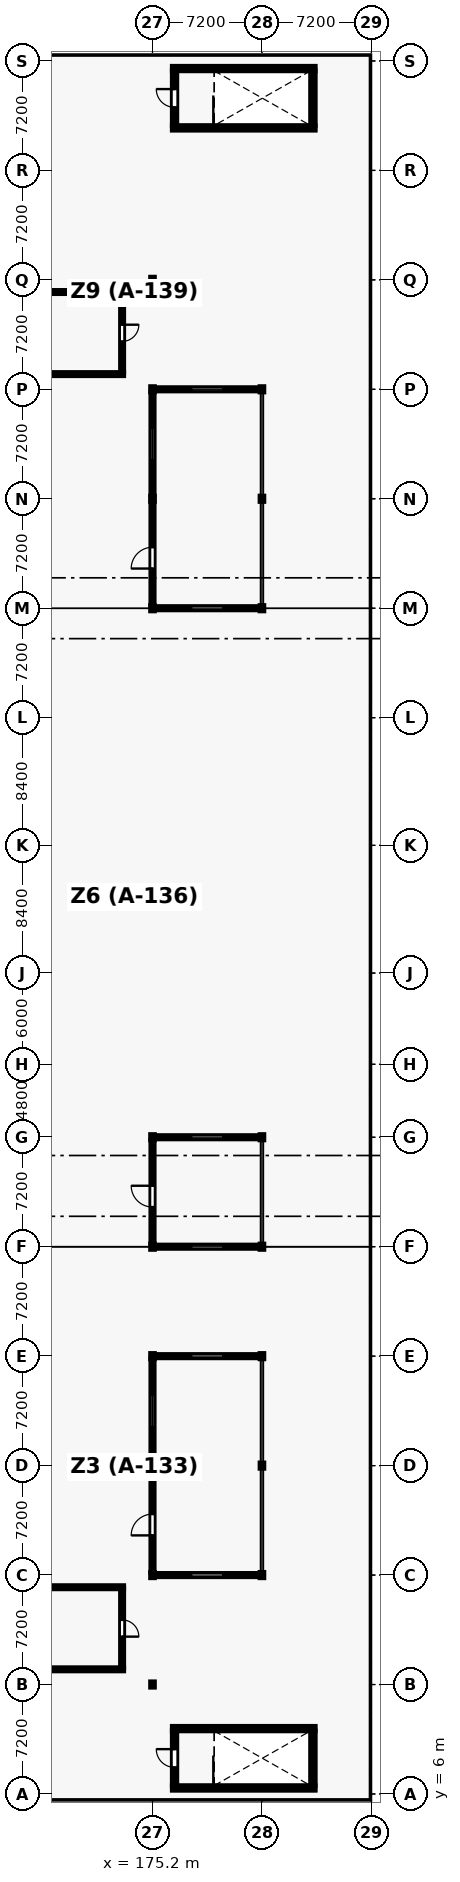
"""IFC4 building model, lengths in metres.
Left out: names, types, materials, properties, quantities, classifications, styles, units other than length and angle.
Written with IfcOpenShell. Run it as: python <this file> out.ifc"""

import sys

from ifc_helpers import new_model, si_unit, direction, frame, frame_2d, origin, origin_2d, place, context, subcontext, project, spatial, rectangle, i_section, extrude, element, fill, save


model = new_model("IFC4")
c1 = context("Model", 3, precision=1e-05, world=origin(), true_north=direction((0.0, 1.0)))
c2 = subcontext(c1, "Body", "Model", "MODEL_VIEW")
j1 = project(units=[si_unit("LENGTHUNIT", "METRE"), si_unit("PLANEANGLEUNIT", "RADIAN")], contexts=[c1])
p1 = place(None, origin())
s1 = spatial("IfcSite", under=j1, at=p1, CompositionType="ELEMENT")
p2 = place(p1, origin())
s2 = spatial("IfcBuilding", under=s1, at=p2, CompositionType="ELEMENT")
p3 = place(p2, frame((0.0, 0.0, 13.2)))
s3 = spatial("IfcBuildingStorey", under=s2, at=p3, CompositionType="ELEMENT", Elevation=13.2)
for number, where, z_axis, x_axis in (
    (1, (175.2, 13.2, 0.0), (0.0, 0.0, 1.0), (1.0, 0.0, 0.0)),
    (2, (175.2, 20.4, 0.0), (0.0, 0.0, 1.0), (1.0, 0.0, 0.0)),
    (3, (175.2, 27.6, 0.0), (0.0, 0.0, 1.0), (1.0, 0.0, 0.0)),
    (4, (175.2, 34.8, 0.0), (0.0, 0.0, 1.0), (1.0, 0.0, 0.0)),
    (5, (175.2, 42.0, 0.0), (0.0, 0.0, 1.0), (1.0, 0.0, 0.0)),
    (6, (175.2, 49.2, 0.0), (0.0, 0.0, 1.0), (1.0, 0.0, 0.0)),
    (7, (175.2, 84.0, 0.0), (0.0, 0.0, 1.0), (1.0, 0.0, 0.0)),
    (8, (175.2, 91.2, 0.0), (0.0, 0.0, 1.0), (1.0, 0.0, 0.0)),
    (9, (175.2, 98.4, 0.0), (0.0, 0.0, 1.0), (1.0, 0.0, 0.0)),
    (10, (175.2, 105.6, 0.0), (0.0, 0.0, 1.0), (1.0, 0.0, 0.0)),
    (11, (182.4, 20.4, 0.0), (0.0, 0.0, 1.0), (1.0, 0.0, 0.0)),
    (12, (182.4, 27.6, 0.0), (0.0, 0.0, 1.0), (1.0, 0.0, 0.0)),
    (13, (182.4, 34.8, 0.0), (0.0, 0.0, 1.0), (1.0, 0.0, 0.0)),
    (14, (182.4, 42.0, 0.0), (0.0, 0.0, 1.0), (1.0, 0.0, 0.0)),
    (15, (182.4, 49.2, 0.0), (0.0, 0.0, 1.0), (1.0, 0.0, 0.0)),
    (16, (182.4, 84.0, 0.0), (0.0, 0.0, 1.0), (1.0, 0.0, 0.0)),
    (17, (182.4, 91.2, 0.0), (0.0, 0.0, 1.0), (1.0, 0.0, 0.0)),
    (18, (182.4, 98.4, 0.0), (0.0, 0.0, 1.0), (1.0, 0.0, 0.0)),
):
    element("IfcColumn", number, at=place(p3, frame(where, z_axis=z_axis, x_axis=x_axis)), inside=s3, PredefinedType="COLUMN", context=c2, shape_type="SweptSolid", body=[
        extrude(i_section(OverallWidth=0.254, OverallDepth=0.356, WebThickness=0.01, FlangeThickness=0.018, FilletRadius=0.015, at=origin_2d()), origin(), (0.0, 0.0, 1.0), 3.66),
    ])
p4 = place(p3, frame((175.2, 20.58, 0.0), z_axis=(0.0, 0.0, 1.0), x_axis=(0.0, 1.0, 0.0)))
e19 = element("IfcWall", 19, at=p4, inside=s3, PredefinedType="STANDARD", context=c2, shape_type="SweptSolid", body=[
    extrude(rectangle(XDim=6.84, YDim=0.22, at=frame_2d((3.42, 0.0))), origin(), (0.0, 0.0, 1.0), 3.19),
])
p5 = place(p4, frame((2.43, 0.0, 0.0)))
e20 = element("IfcOpeningElement", 20, at=p5, cuts=e19, PredefinedType="OPENING", context=c2, shape_type="SweptSolid", body=[
    extrude(rectangle(XDim=1.4, YDim=2.15, at=frame_2d((0.7, 1.075))), frame((0.0, 0.12, 0.0), z_axis=(0.0, -1.0, 0.0), x_axis=(1.0, 0.0, 0.0)), (0.0, 0.0, 1.0), 0.24),
])
p6 = place(p3, frame((175.2, 27.78, 0.0), z_axis=(0.0, 0.0, 1.0), x_axis=(0.0, 1.0, 0.0)))
e21 = element("IfcWall", 21, at=p6, inside=s3, PredefinedType="STANDARD", context=c2, shape_type="SweptSolid", body=[
    extrude(rectangle(XDim=6.84, YDim=0.22, at=frame_2d((3.42, 0.0))), origin(), (0.0, 0.0, 1.0), 3.19),
])
p7 = place(p6, frame((2.37, 0.0, 0.95)))
e22 = element("IfcOpeningElement", 22, at=p7, cuts=e21, PredefinedType="OPENING", context=c2, shape_type="SweptSolid", body=[
    extrude(rectangle(XDim=2.1, YDim=1.5, at=frame_2d((1.05, 0.75))), frame((0.0, 0.12, 0.0), z_axis=(0.0, -1.0, 0.0), x_axis=(1.0, 0.0, 0.0)), (0.0, 0.0, 1.0), 0.24),
])
p8 = place(p3, frame((182.266, 20.4, 0.0), z_axis=(0.0, 0.0, 1.0), x_axis=(-1.0, 0.0, 0.0)))
e23 = element("IfcWall", 23, at=p8, inside=s3, PredefinedType="STANDARD", context=c2, shape_type="SweptSolid", body=[
    extrude(rectangle(XDim=6.932, YDim=0.22, at=frame_2d((3.466, 0.0))), origin(), (0.0, 0.0, 1.0), 3.19),
])
p9 = place(p8, frame((2.416, 0.0, 0.95)))
e24 = element("IfcOpeningElement", 24, at=p9, cuts=e23, PredefinedType="OPENING", context=c2, shape_type="SweptSolid", body=[
    extrude(rectangle(XDim=2.1, YDim=1.5, at=frame_2d((1.05, 0.75))), frame((0.0, 0.12, 0.0), z_axis=(0.0, -1.0, 0.0), x_axis=(1.0, 0.0, 0.0)), (0.0, 0.0, 1.0), 0.24),
])
p10 = place(p3, frame((175.334, 34.8, 0.0), z_axis=(0.0, 0.0, 1.0), x_axis=(1.0, 0.0, 0.0)))
e25 = element("IfcWall", 25, at=p10, inside=s3, PredefinedType="STANDARD", context=c2, shape_type="SweptSolid", body=[
    extrude(rectangle(XDim=6.932, YDim=0.22, at=frame_2d((3.466, 0.0))), origin(), (0.0, 0.0, 1.0), 3.19),
])
p11 = place(p10, frame((2.416, 0.0, 0.95)))
e26 = element("IfcOpeningElement", 26, at=p11, cuts=e25, PredefinedType="OPENING", context=c2, shape_type="SweptSolid", body=[
    extrude(rectangle(XDim=2.1, YDim=1.5, at=frame_2d((1.05, 0.75))), frame((0.0, 0.12, 0.0), z_axis=(0.0, -1.0, 0.0), x_axis=(1.0, 0.0, 0.0)), (0.0, 0.0, 1.0), 0.24),
])
p12 = place(p3, frame((175.2, 42.18, 0.0), z_axis=(0.0, 0.0, 1.0), x_axis=(0.0, 1.0, 0.0)))
e27 = element("IfcWall", 27, at=p12, inside=s3, PredefinedType="STANDARD", context=c2, shape_type="SweptSolid", body=[
    extrude(rectangle(XDim=6.84, YDim=0.22, at=frame_2d((3.42, 0.0))), origin(), (0.0, 0.0, 1.0), 3.19),
])
p13 = place(p12, frame((2.43, 0.0, 0.0)))
e28 = element("IfcOpeningElement", 28, at=p13, cuts=e27, PredefinedType="OPENING", context=c2, shape_type="SweptSolid", body=[
    extrude(rectangle(XDim=1.4, YDim=2.15, at=frame_2d((0.7, 1.075))), frame((0.0, 0.12, 0.0), z_axis=(0.0, -1.0, 0.0), x_axis=(1.0, 0.0, 0.0)), (0.0, 0.0, 1.0), 0.24),
])
p14 = place(p3, frame((182.266, 42.0, 0.0), z_axis=(0.0, 0.0, 1.0), x_axis=(-1.0, 0.0, 0.0)))
e29 = element("IfcWall", 29, at=p14, inside=s3, PredefinedType="STANDARD", context=c2, shape_type="SweptSolid", body=[
    extrude(rectangle(XDim=6.932, YDim=0.22, at=frame_2d((3.466, 0.0))), origin(), (0.0, 0.0, 1.0), 3.19),
])
p15 = place(p14, frame((2.416, 0.0, 0.95)))
e30 = element("IfcOpeningElement", 30, at=p15, cuts=e29, PredefinedType="OPENING", context=c2, shape_type="SweptSolid", body=[
    extrude(rectangle(XDim=2.1, YDim=1.5, at=frame_2d((1.05, 0.75))), frame((0.0, 0.12, 0.0), z_axis=(0.0, -1.0, 0.0), x_axis=(1.0, 0.0, 0.0)), (0.0, 0.0, 1.0), 0.24),
])
p16 = place(p3, frame((175.334, 49.2, 0.0), z_axis=(0.0, 0.0, 1.0), x_axis=(1.0, 0.0, 0.0)))
e31 = element("IfcWall", 31, at=p16, inside=s3, PredefinedType="STANDARD", context=c2, shape_type="SweptSolid", body=[
    extrude(rectangle(XDim=6.932, YDim=0.22, at=frame_2d((3.466, 0.0))), origin(), (0.0, 0.0, 1.0), 3.19),
])
p17 = place(p16, frame((2.416, 0.0, 0.95)))
e32 = element("IfcOpeningElement", 32, at=p17, cuts=e31, PredefinedType="OPENING", context=c2, shape_type="SweptSolid", body=[
    extrude(rectangle(XDim=2.1, YDim=1.5, at=frame_2d((1.05, 0.75))), frame((0.0, 0.12, 0.0), z_axis=(0.0, -1.0, 0.0), x_axis=(1.0, 0.0, 0.0)), (0.0, 0.0, 1.0), 0.24),
])
p18 = place(p3, frame((175.2, 84.18, 0.0), z_axis=(0.0, 0.0, 1.0), x_axis=(0.0, 1.0, 0.0)))
e33 = element("IfcWall", 33, at=p18, inside=s3, PredefinedType="STANDARD", context=c2, shape_type="SweptSolid", body=[
    extrude(rectangle(XDim=6.84, YDim=0.22, at=frame_2d((3.42, 0.0))), origin(), (0.0, 0.0, 1.0), 3.19),
])
p19 = place(p18, frame((2.43, 0.0, 0.0)))
e34 = element("IfcOpeningElement", 34, at=p19, cuts=e33, PredefinedType="OPENING", context=c2, shape_type="SweptSolid", body=[
    extrude(rectangle(XDim=1.4, YDim=2.15, at=frame_2d((0.7, 1.075))), frame((0.0, 0.12, 0.0), z_axis=(0.0, -1.0, 0.0), x_axis=(1.0, 0.0, 0.0)), (0.0, 0.0, 1.0), 0.24),
])
p20 = place(p3, frame((175.2, 91.38, 0.0), z_axis=(0.0, 0.0, 1.0), x_axis=(0.0, 1.0, 0.0)))
e35 = element("IfcWall", 35, at=p20, inside=s3, PredefinedType="STANDARD", context=c2, shape_type="SweptSolid", body=[
    extrude(rectangle(XDim=6.84, YDim=0.22, at=frame_2d((3.42, 0.0))), origin(), (0.0, 0.0, 1.0), 3.19),
])
p21 = place(p20, frame((2.37, 0.0, 0.95)))
e36 = element("IfcOpeningElement", 36, at=p21, cuts=e35, PredefinedType="OPENING", context=c2, shape_type="SweptSolid", body=[
    extrude(rectangle(XDim=2.1, YDim=1.5, at=frame_2d((1.05, 0.75))), frame((0.0, 0.12, 0.0), z_axis=(0.0, -1.0, 0.0), x_axis=(1.0, 0.0, 0.0)), (0.0, 0.0, 1.0), 0.24),
])
p22 = place(p3, frame((182.266, 84.0, 0.0), z_axis=(0.0, 0.0, 1.0), x_axis=(-1.0, 0.0, 0.0)))
e37 = element("IfcWall", 37, at=p22, inside=s3, PredefinedType="STANDARD", context=c2, shape_type="SweptSolid", body=[
    extrude(rectangle(XDim=6.932, YDim=0.22, at=frame_2d((3.466, 0.0))), origin(), (0.0, 0.0, 1.0), 3.19),
])
p23 = place(p22, frame((2.416, 0.0, 0.95)))
e38 = element("IfcOpeningElement", 38, at=p23, cuts=e37, PredefinedType="OPENING", context=c2, shape_type="SweptSolid", body=[
    extrude(rectangle(XDim=2.1, YDim=1.5, at=frame_2d((1.05, 0.75))), frame((0.0, 0.12, 0.0), z_axis=(0.0, -1.0, 0.0), x_axis=(1.0, 0.0, 0.0)), (0.0, 0.0, 1.0), 0.24),
])
p24 = place(p3, frame((175.334, 98.4, 0.0), z_axis=(0.0, 0.0, 1.0), x_axis=(1.0, 0.0, 0.0)))
e39 = element("IfcWall", 39, at=p24, inside=s3, PredefinedType="STANDARD", context=c2, shape_type="SweptSolid", body=[
    extrude(rectangle(XDim=6.932, YDim=0.22, at=frame_2d((3.466, 0.0))), origin(), (0.0, 0.0, 1.0), 3.19),
])
p25 = place(p24, frame((2.416, 0.0, 0.95)))
e40 = element("IfcOpeningElement", 40, at=p25, cuts=e39, PredefinedType="OPENING", context=c2, shape_type="SweptSolid", body=[
    extrude(rectangle(XDim=2.1, YDim=1.5, at=frame_2d((1.05, 0.75))), frame((0.0, 0.12, 0.0), z_axis=(0.0, -1.0, 0.0), x_axis=(1.0, 0.0, 0.0)), (0.0, 0.0, 1.0), 0.24),
])
for number, where, z_axis, x_axis in (
    (41, (185.9, 6.4, 0.0), (0.0, 0.0, 1.0), (-1.0, 0.0, 0.0)),
    (42, (176.5, 10.3, 0.0), (0.0, 0.0, 1.0), (1.0, 0.0, 0.0)),
):
    element("IfcWall", number, at=place(p3, frame(where, z_axis=z_axis, x_axis=x_axis)), inside=s3, PredefinedType="SOLIDWALL", context=c2, shape_type="SweptSolid", body=[
        extrude(rectangle(XDim=9.4, YDim=0.3, at=frame_2d((4.7, 0.0))), origin(), (0.0, 0.0, 1.0), 3.4),
    ])
p26 = place(p3, frame((176.65, 6.55, 0.0), z_axis=(0.0, 0.0, 1.0), x_axis=(0.0, 1.0, 0.0)))
e43 = element("IfcWall", 43, at=p26, inside=s3, PredefinedType="SOLIDWALL", context=c2, shape_type="SweptSolid", body=[
    extrude(rectangle(XDim=3.6, YDim=0.3, at=frame_2d((1.8, 0.0))), origin(), (0.0, 0.0, 1.0), 3.4),
])
p27 = place(p26, frame((1.2, 0.0, 0.0)))
e44 = element("IfcOpeningElement", 44, at=p27, cuts=e43, PredefinedType="OPENING", context=c2, shape_type="SweptSolid", body=[
    extrude(rectangle(XDim=1.2, YDim=2.2, at=frame_2d((0.6, 1.1))), frame((0.0, 0.16, 0.0), z_axis=(0.0, -1.0, 0.0), x_axis=(1.0, 0.0, 0.0)), (0.0, 0.0, 1.0), 0.32),
])
p28 = place(p3, frame((185.75, 10.15, 0.0), z_axis=(0.0, 0.0, 1.0), x_axis=(0.0, -1.0, 0.0)))
e45 = element("IfcWall", 45, at=p28, inside=s3, PredefinedType="SOLIDWALL", context=c2, shape_type="SweptSolid", body=[
    extrude(rectangle(XDim=3.6, YDim=0.3, at=frame_2d((1.8, 0.0))), origin(), (0.0, 0.0, 1.0), 3.4),
])
for number, where, z_axis, x_axis in (
    (46, (185.9, 115.6, 0.0), (0.0, 0.0, 1.0), (-1.0, 0.0, 0.0)),
    (47, (176.5, 119.5, 0.0), (0.0, 0.0, 1.0), (1.0, 0.0, 0.0)),
):
    element("IfcWall", number, at=place(p3, frame(where, z_axis=z_axis, x_axis=x_axis)), inside=s3, PredefinedType="SOLIDWALL", context=c2, shape_type="SweptSolid", body=[
        extrude(rectangle(XDim=9.4, YDim=0.3, at=frame_2d((4.7, 0.0))), origin(), (0.0, 0.0, 1.0), 3.4),
    ])
p29 = place(p3, frame((176.65, 115.75, 0.0), z_axis=(0.0, 0.0, 1.0), x_axis=(0.0, 1.0, 0.0)))
e48 = element("IfcWall", 48, at=p29, inside=s3, PredefinedType="SOLIDWALL", context=c2, shape_type="SweptSolid", body=[
    extrude(rectangle(XDim=3.6, YDim=0.3, at=frame_2d((1.8, 0.0))), origin(), (0.0, 0.0, 1.0), 3.4),
])
p30 = place(p29, frame((1.2, 0.0, 0.0)))
e49 = element("IfcOpeningElement", 49, at=p30, cuts=e48, PredefinedType="OPENING", context=c2, shape_type="SweptSolid", body=[
    extrude(rectangle(XDim=1.2, YDim=2.2, at=frame_2d((0.6, 1.1))), frame((0.0, 0.16, 0.0), z_axis=(0.0, -1.0, 0.0), x_axis=(1.0, 0.0, 0.0)), (0.0, 0.0, 1.0), 0.32),
])
p31 = place(p3, frame((185.75, 119.35, 0.0), z_axis=(0.0, 0.0, 1.0), x_axis=(0.0, -1.0, 0.0)))
e50 = element("IfcWall", 50, at=p31, inside=s3, PredefinedType="SOLIDWALL", context=c2, shape_type="SweptSolid", body=[
    extrude(rectangle(XDim=3.6, YDim=0.3, at=frame_2d((1.8, 0.0))), origin(), (0.0, 0.0, 1.0), 3.4),
])
for number, where, z_axis, x_axis in (
    (51, (173.306, 14.2, 0.0), (0.0, 0.0, 1.0), (-1.0, 0.0, 0.0)),
    (52, (165.906, 19.6, 0.0), (0.0, 0.0, 1.0), (1.0, 0.0, 0.0)),
):
    element("IfcWall", number, at=place(p3, frame(where, z_axis=z_axis, x_axis=x_axis)), inside=s3, PredefinedType="PARTITIONING", context=c2, shape_type="SweptSolid", body=[
        extrude(rectangle(XDim=7.4, YDim=0.212, at=frame_2d((3.7, 0.0))), origin(), (0.0, 0.0, 1.0), 3.13),
    ])
p32 = place(p3, frame((173.2, 19.492, 0.0), z_axis=(0.0, 0.0, 1.0), x_axis=(0.0, -1.0, 0.0)))
e53 = element("IfcWall", 53, at=p32, inside=s3, PredefinedType="PARTITIONING", context=c2, shape_type="SweptSolid", body=[
    extrude(rectangle(XDim=5.184, YDim=0.212, at=frame_2d((2.592, 0.0))), origin(), (0.0, 0.0, 1.0), 3.13),
])
p33 = place(p32, frame((2.042, 0.0, 0.0)))
e54 = element("IfcOpeningElement", 54, at=p33, cuts=e53, PredefinedType="OPENING", context=c2, shape_type="SweptSolid", body=[
    extrude(rectangle(XDim=1.1, YDim=2.1, at=frame_2d((0.55, 1.05))), frame((0.0, 0.116, 0.0), z_axis=(0.0, -1.0, 0.0), x_axis=(1.0, 0.0, 0.0)), (0.0, 0.0, 1.0), 0.232),
])
for number, where, z_axis, x_axis in (
    (55, (173.306, 99.4, 0.0), (0.0, 0.0, 1.0), (-1.0, 0.0, 0.0)),
    (56, (165.889, 104.8, 0.0), (0.0, 0.0, 1.0), (1.0, 0.0, 0.0)),
):
    element("IfcWall", number, at=place(p3, frame(where, z_axis=z_axis, x_axis=x_axis)), inside=s3, PredefinedType="PARTITIONING", context=c2, shape_type="SweptSolid", body=[
        extrude(rectangle(XDim=7.417, YDim=0.212, at=frame_2d((3.708, 0.0))), origin(), (0.0, 0.0, 1.0), 3.13),
    ])
p34 = place(p3, frame((173.2, 104.692, 0.0), z_axis=(0.0, 0.0, 1.0), x_axis=(0.0, -1.0, 0.0)))
e57 = element("IfcWall", 57, at=p34, inside=s3, PredefinedType="PARTITIONING", context=c2, shape_type="SweptSolid", body=[
    extrude(rectangle(XDim=5.184, YDim=0.212, at=frame_2d((2.592, 0.0))), origin(), (0.0, 0.0, 1.0), 3.13),
])
p35 = place(p34, frame((2.042, 0.0, 0.0)))
e58 = element("IfcOpeningElement", 58, at=p35, cuts=e57, PredefinedType="OPENING", context=c2, shape_type="SweptSolid", body=[
    extrude(rectangle(XDim=1.1, YDim=2.1, at=frame_2d((0.55, 1.05))), frame((0.0, 0.116, 0.0), z_axis=(0.0, -1.0, 0.0), x_axis=(1.0, 0.0, 0.0)), (0.0, 0.0, 1.0), 0.232),
])
p36 = place(p5, origin())
e59 = element("IfcDoor", 59, at=p36, inside=s3, OperationType="SINGLE_SWING_LEFT", PredefinedType="DOOR", context=c2, shape_type="SweptSolid", body=[
    extrude(rectangle(XDim=1.4, YDim=2.15, at=frame_2d((0.7, 1.075))), frame((0.0, 0.025, 0.0), z_axis=(0.0, -1.0, 0.0), x_axis=(1.0, 0.0, 0.0)), (0.0, 0.0, 1.0), 0.05),
])
fill(e20, e59)
p37 = place(p7, origin())
e60 = element("IfcWindow", 60, at=p37, inside=s3, PartitioningType="SINGLE_PANEL", PredefinedType="WINDOW", context=c2, shape_type="SweptSolid", body=[
    extrude(rectangle(XDim=2.1, YDim=1.5, at=frame_2d((1.05, 0.75))), frame((0.0, 0.03, 0.0), z_axis=(0.0, -1.0, 0.0), x_axis=(1.0, 0.0, 0.0)), (0.0, 0.0, 1.0), 0.06),
])
fill(e22, e60)
p38 = place(p9, origin())
e61 = element("IfcWindow", 61, at=p38, inside=s3, PartitioningType="SINGLE_PANEL", PredefinedType="WINDOW", context=c2, shape_type="SweptSolid", body=[
    extrude(rectangle(XDim=2.1, YDim=1.5, at=frame_2d((1.05, 0.75))), frame((0.0, 0.03, 0.0), z_axis=(0.0, -1.0, 0.0), x_axis=(1.0, 0.0, 0.0)), (0.0, 0.0, 1.0), 0.06),
])
fill(e24, e61)
p39 = place(p11, origin())
e62 = element("IfcWindow", 62, at=p39, inside=s3, PartitioningType="SINGLE_PANEL", PredefinedType="WINDOW", context=c2, shape_type="SweptSolid", body=[
    extrude(rectangle(XDim=2.1, YDim=1.5, at=frame_2d((1.05, 0.75))), frame((0.0, 0.03, 0.0), z_axis=(0.0, -1.0, 0.0), x_axis=(1.0, 0.0, 0.0)), (0.0, 0.0, 1.0), 0.06),
])
fill(e26, e62)
p40 = place(p13, origin())
e63 = element("IfcDoor", 63, at=p40, inside=s3, OperationType="SINGLE_SWING_RIGHT", PredefinedType="DOOR", context=c2, shape_type="SweptSolid", body=[
    extrude(rectangle(XDim=1.4, YDim=2.15, at=frame_2d((0.7, 1.075))), frame((0.0, 0.025, 0.0), z_axis=(0.0, -1.0, 0.0), x_axis=(1.0, 0.0, 0.0)), (0.0, 0.0, 1.0), 0.05),
])
fill(e28, e63)
p41 = place(p15, origin())
e64 = element("IfcWindow", 64, at=p41, inside=s3, PartitioningType="SINGLE_PANEL", PredefinedType="WINDOW", context=c2, shape_type="SweptSolid", body=[
    extrude(rectangle(XDim=2.1, YDim=1.5, at=frame_2d((1.05, 0.75))), frame((0.0, 0.03, 0.0), z_axis=(0.0, -1.0, 0.0), x_axis=(1.0, 0.0, 0.0)), (0.0, 0.0, 1.0), 0.06),
])
fill(e30, e64)
p42 = place(p17, origin())
e65 = element("IfcWindow", 65, at=p42, inside=s3, PartitioningType="SINGLE_PANEL", PredefinedType="WINDOW", context=c2, shape_type="SweptSolid", body=[
    extrude(rectangle(XDim=2.1, YDim=1.5, at=frame_2d((1.05, 0.75))), frame((0.0, 0.03, 0.0), z_axis=(0.0, -1.0, 0.0), x_axis=(1.0, 0.0, 0.0)), (0.0, 0.0, 1.0), 0.06),
])
fill(e32, e65)
p43 = place(p19, origin())
e66 = element("IfcDoor", 66, at=p43, inside=s3, OperationType="SINGLE_SWING_LEFT", PredefinedType="DOOR", context=c2, shape_type="SweptSolid", body=[
    extrude(rectangle(XDim=1.4, YDim=2.15, at=frame_2d((0.7, 1.075))), frame((0.0, 0.025, 0.0), z_axis=(0.0, -1.0, 0.0), x_axis=(1.0, 0.0, 0.0)), (0.0, 0.0, 1.0), 0.05),
])
fill(e34, e66)
p44 = place(p21, origin())
e67 = element("IfcWindow", 67, at=p44, inside=s3, PartitioningType="SINGLE_PANEL", PredefinedType="WINDOW", context=c2, shape_type="SweptSolid", body=[
    extrude(rectangle(XDim=2.1, YDim=1.5, at=frame_2d((1.05, 0.75))), frame((0.0, 0.03, 0.0), z_axis=(0.0, -1.0, 0.0), x_axis=(1.0, 0.0, 0.0)), (0.0, 0.0, 1.0), 0.06),
])
fill(e36, e67)
p45 = place(p23, origin())
e68 = element("IfcWindow", 68, at=p45, inside=s3, PartitioningType="SINGLE_PANEL", PredefinedType="WINDOW", context=c2, shape_type="SweptSolid", body=[
    extrude(rectangle(XDim=2.1, YDim=1.5, at=frame_2d((1.05, 0.75))), frame((0.0, 0.03, 0.0), z_axis=(0.0, -1.0, 0.0), x_axis=(1.0, 0.0, 0.0)), (0.0, 0.0, 1.0), 0.06),
])
fill(e38, e68)
p46 = place(p25, origin())
e69 = element("IfcWindow", 69, at=p46, inside=s3, PartitioningType="SINGLE_PANEL", PredefinedType="WINDOW", context=c2, shape_type="SweptSolid", body=[
    extrude(rectangle(XDim=2.1, YDim=1.5, at=frame_2d((1.05, 0.75))), frame((0.0, 0.03, 0.0), z_axis=(0.0, -1.0, 0.0), x_axis=(1.0, 0.0, 0.0)), (0.0, 0.0, 1.0), 0.06),
])
fill(e40, e69)
p47 = place(p27, origin())
e70 = element("IfcDoor", 70, at=p47, inside=s3, OperationType="SINGLE_SWING_RIGHT", PredefinedType="DOOR", context=c2, shape_type="SweptSolid", body=[
    extrude(rectangle(XDim=1.2, YDim=2.2, at=frame_2d((0.6, 1.1))), frame((0.0, 0.025, 0.0), z_axis=(0.0, -1.0, 0.0), x_axis=(1.0, 0.0, 0.0)), (0.0, 0.0, 1.0), 0.05),
])
fill(e44, e70)
p48 = place(p30, origin())
e71 = element("IfcDoor", 71, at=p48, inside=s3, OperationType="SINGLE_SWING_RIGHT", PredefinedType="DOOR", context=c2, shape_type="SweptSolid", body=[
    extrude(rectangle(XDim=1.2, YDim=2.2, at=frame_2d((0.6, 1.1))), frame((0.0, 0.025, 0.0), z_axis=(0.0, -1.0, 0.0), x_axis=(1.0, 0.0, 0.0)), (0.0, 0.0, 1.0), 0.05),
])
fill(e49, e71)
p49 = place(p33, origin())
e72 = element("IfcDoor", 72, at=p49, inside=s3, OperationType="SINGLE_SWING_RIGHT", PredefinedType="DOOR", context=c2, shape_type="SweptSolid", body=[
    extrude(rectangle(XDim=1.1, YDim=2.1, at=frame_2d((0.55, 1.05))), frame((0.0, 0.025, 0.0), z_axis=(0.0, -1.0, 0.0), x_axis=(1.0, 0.0, 0.0)), (0.0, 0.0, 1.0), 0.05),
])
fill(e54, e72)
p50 = place(p35, origin())
e73 = element("IfcDoor", 73, at=p50, inside=s3, OperationType="SINGLE_SWING_LEFT", PredefinedType="DOOR", context=c2, shape_type="SweptSolid", body=[
    extrude(rectangle(XDim=1.1, YDim=2.1, at=frame_2d((0.55, 1.05))), frame((0.0, 0.025, 0.0), z_axis=(0.0, -1.0, 0.0), x_axis=(1.0, 0.0, 0.0)), (0.0, 0.0, 1.0), 0.05),
])
fill(e58, e73)
save(model, sys.argv[1])
